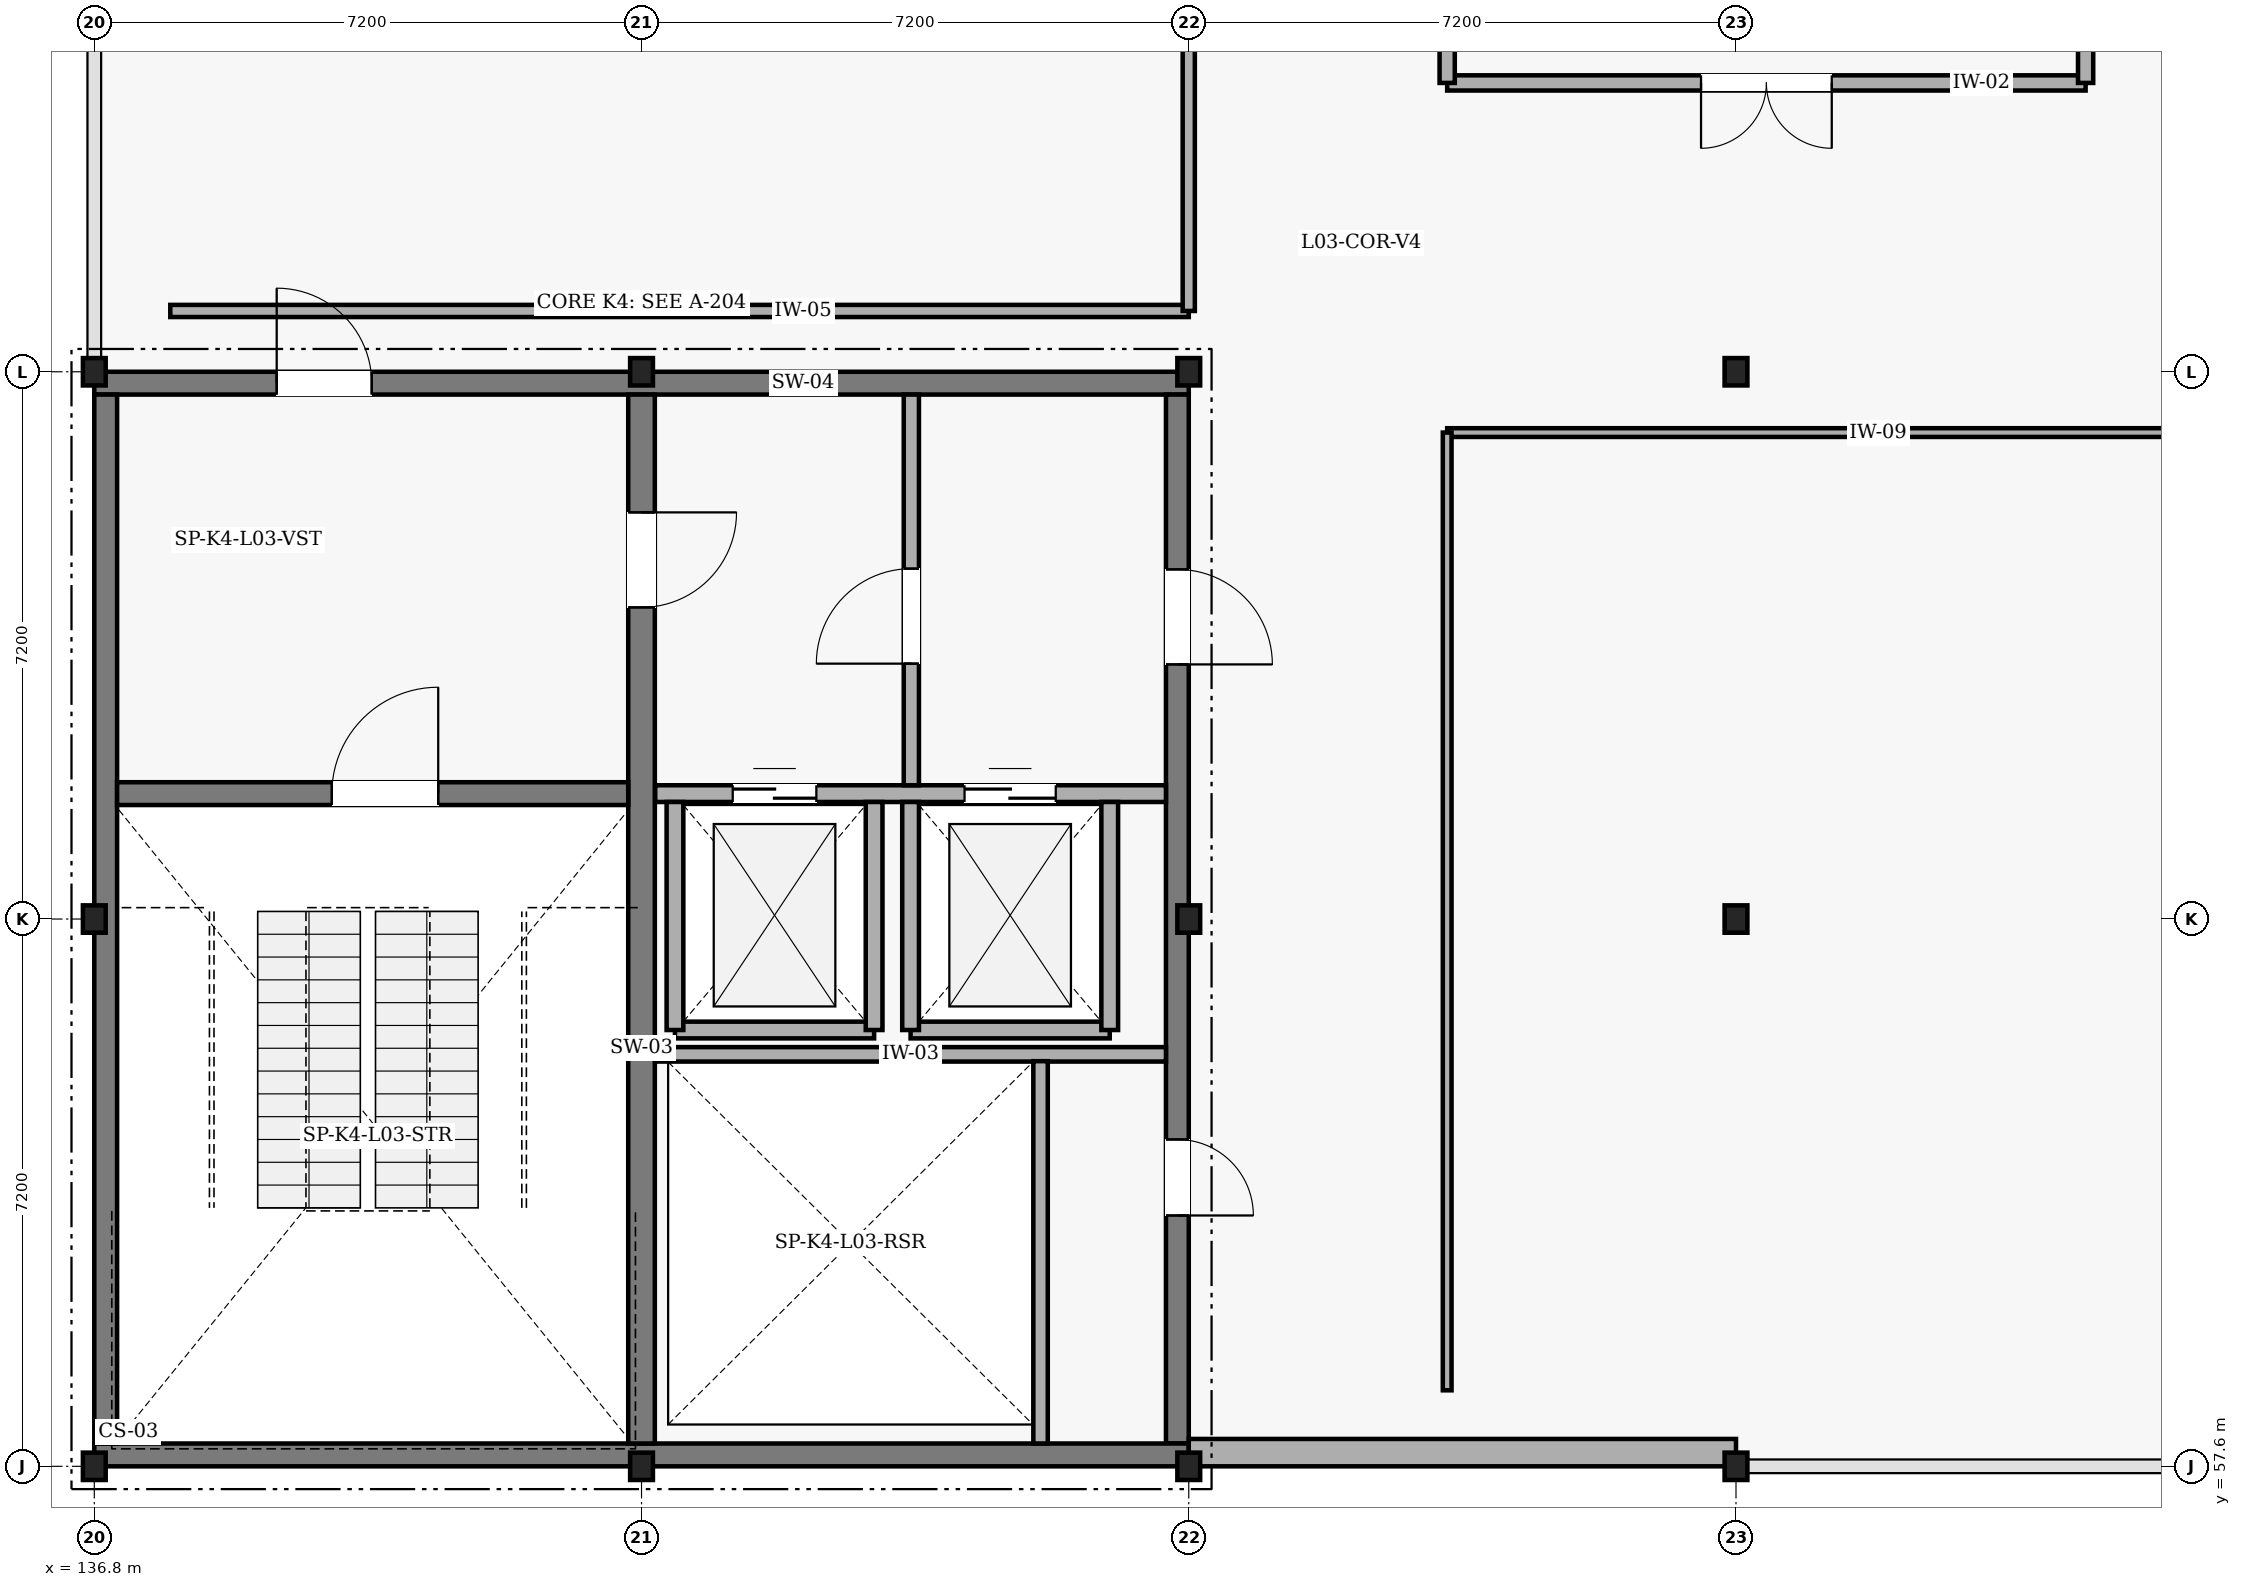
"""IFC4 building model, lengths in metres.
Left out: names, types, materials, properties, quantities, classifications, styles, units other than length and angle.
Written with IfcOpenShell. Run it as: python <this file> out.ifc"""

import sys

from ifc_helpers import new_model, si_unit, direction, frame, frame_2d, origin, origin_2d, place, context, subcontext, project, spatial, rectangle, i_section, extrude, element, fill, save


model = new_model("IFC4")
c1 = context("Model", 3, precision=1e-05, world=origin(), true_north=direction((0.0, 1.0)))
c2 = subcontext(c1, "Body", "Model", "MODEL_VIEW")
j1 = project(units=[si_unit("LENGTHUNIT", "METRE"), si_unit("PLANEANGLEUNIT", "RADIAN")], contexts=[c1])
p1 = place(None, origin())
s1 = spatial("IfcSite", under=j1, at=p1, CompositionType="ELEMENT")
p2 = place(p1, origin())
s2 = spatial("IfcBuilding", under=s1, at=p2, CompositionType="ELEMENT")
p3 = place(p2, frame((0.0, 0.0, 13.8)))
s3 = spatial("IfcBuildingStorey", under=s2, at=p3, CompositionType="ELEMENT", Elevation=13.8)
p4 = place(p3, frame((136.8, 71.85, 0.0), z_axis=(0.0, 0.0, 1.0), x_axis=(1.0, 0.0, 0.0)))
e1 = element("IfcWall", 1, at=p4, inside=s3, PredefinedType="SHEAR", context=c2, shape_type="SweptSolid", body=[
    extrude(rectangle(XDim=14.4, YDim=0.3, at=frame_2d((7.2, 0.0))), origin(), (0.0, 0.0, 1.0), 4.2),
])
p5 = place(p4, frame((2.4, 0.0, 0.0)))
e2 = element("IfcOpeningElement", 2, at=p5, cuts=e1, PredefinedType="OPENING", context=c2, shape_type="SweptSolid", body=[
    extrude(rectangle(XDim=1.25, YDim=2.2, at=frame_2d((0.625, 1.1))), frame((0.0, 0.16, 0.0), z_axis=(0.0, -1.0, 0.0), x_axis=(1.0, 0.0, 0.0)), (0.0, 0.0, 1.0), 0.32),
])
p6 = place(p3, frame((151.05, 71.7, 0.0), z_axis=(0.0, 0.0, 1.0), x_axis=(0.0, -1.0, 0.0)))
e3 = element("IfcWall", 3, at=p6, inside=s3, PredefinedType="SHEAR", context=c2, shape_type="SweptSolid", body=[
    extrude(rectangle(XDim=13.8, YDim=0.3, at=frame_2d((6.9, 0.0))), origin(), (0.0, 0.0, 1.0), 4.2),
])
p7 = place(p6, frame((9.8, 0.0, 0.0)))
e4 = element("IfcOpeningElement", 4, at=p7, cuts=e3, PredefinedType="OPENING", context=c2, shape_type="SweptSolid", body=[
    extrude(rectangle(XDim=1.0, YDim=2.15, at=frame_2d((0.5, 1.075))), frame((0.0, 0.16, 0.0), z_axis=(0.0, -1.0, 0.0), x_axis=(1.0, 0.0, 0.0)), (0.0, 0.0, 1.0), 0.32),
])
p8 = place(p6, frame((2.3, 0.0, 0.0)))
e5 = element("IfcOpeningElement", 5, at=p8, cuts=e3, PredefinedType="OPENING", context=c2, shape_type="SweptSolid", body=[
    extrude(rectangle(XDim=1.25, YDim=2.2, at=frame_2d((0.625, 1.1))), frame((0.0, 0.16, 0.0), z_axis=(0.0, -1.0, 0.0), x_axis=(1.0, 0.0, 0.0)), (0.0, 0.0, 1.0), 0.32),
])
p9 = place(p3, frame((151.2, 57.75, 0.0), z_axis=(0.0, 0.0, 1.0), x_axis=(-1.0, 0.0, 0.0)))
e6 = element("IfcWall", 6, at=p9, inside=s3, PredefinedType="SHEAR", context=c2, shape_type="SweptSolid", body=[
    extrude(rectangle(XDim=14.4, YDim=0.3, at=frame_2d((7.2, 0.0))), origin(), (0.0, 0.0, 1.0), 4.2),
])
p10 = place(p3, frame((136.95, 57.9, 0.0), z_axis=(0.0, 0.0, 1.0), x_axis=(0.0, 1.0, 0.0)))
e7 = element("IfcWall", 7, at=p10, inside=s3, PredefinedType="SHEAR", context=c2, shape_type="SweptSolid", body=[
    extrude(rectangle(XDim=13.8, YDim=0.3, at=frame_2d((6.9, 0.0))), origin(), (0.0, 0.0, 1.0), 4.2),
])
p11 = place(p3, frame((144.0, 71.7, 0.0), z_axis=(0.0, 0.0, 1.0), x_axis=(0.0, -1.0, 0.0)))
e8 = element("IfcWall", 8, at=p11, inside=s3, PredefinedType="SHEAR", context=c2, shape_type="SweptSolid", body=[
    extrude(rectangle(XDim=13.8, YDim=0.35, at=frame_2d((6.9, 0.0))), origin(), (0.0, 0.0, 1.0), 4.2),
])
p12 = place(p11, frame((1.55, 0.0, 0.0)))
e9 = element("IfcOpeningElement", 9, at=p12, cuts=e8, PredefinedType="OPENING", context=c2, shape_type="SweptSolid", body=[
    extrude(rectangle(XDim=1.25, YDim=2.2, at=frame_2d((0.625, 1.1))), frame((0.0, 0.185, 0.0), z_axis=(0.0, -1.0, 0.0), x_axis=(1.0, 0.0, 0.0)), (0.0, 0.0, 1.0), 0.37),
])
p13 = place(p3, frame((137.1, 66.45, 0.0), z_axis=(0.0, 0.0, 1.0), x_axis=(1.0, 0.0, 0.0)))
e10 = element("IfcWall", 10, at=p13, inside=s3, PredefinedType="SHEAR", context=c2, shape_type="SweptSolid", body=[
    extrude(rectangle(XDim=6.725, YDim=0.3, at=frame_2d((3.362, 0.0))), origin(), (0.0, 0.0, 1.0), 4.2),
])
p14 = place(p13, frame((2.825, 0.0, 0.0)))
e11 = element("IfcOpeningElement", 11, at=p14, cuts=e10, PredefinedType="OPENING", context=c2, shape_type="SweptSolid", body=[
    extrude(rectangle(XDim=1.4, YDim=2.2, at=frame_2d((0.7, 1.1))), frame((0.0, 0.16, 0.0), z_axis=(0.0, -1.0, 0.0), x_axis=(1.0, 0.0, 0.0)), (0.0, 0.0, 1.0), 0.32),
])
for number, where, z_axis, x_axis in (
    (12, (136.8, 57.6, 0.0), (0.0, 0.0, 1.0), (1.0, 0.0, 0.0)),
    (13, (136.8, 64.8, 0.0), (0.0, 0.0, 1.0), (1.0, 0.0, 0.0)),
    (14, (136.8, 72.0, 0.0), (0.0, 0.0, 1.0), (1.0, 0.0, 0.0)),
    (15, (144.0, 57.6, 0.0), (0.0, 0.0, 1.0), (1.0, 0.0, 0.0)),
    (16, (144.0, 72.0, 0.0), (0.0, 0.0, 1.0), (1.0, 0.0, 0.0)),
    (17, (151.2, 57.6, 0.0), (0.0, 0.0, 1.0), (1.0, 0.0, 0.0)),
    (18, (151.2, 64.8, 0.0), (0.0, 0.0, 1.0), (1.0, 0.0, 0.0)),
    (19, (151.2, 72.0, 0.0), (0.0, 0.0, 1.0), (1.0, 0.0, 0.0)),
    (20, (158.4, 57.6, 0.0), (0.0, 0.0, 1.0), (1.0, 0.0, 0.0)),
    (21, (158.4, 64.8, 0.0), (0.0, 0.0, 1.0), (1.0, 0.0, 0.0)),
    (22, (158.4, 72.0, 0.0), (0.0, 0.0, 1.0), (1.0, 0.0, 0.0)),
):
    element("IfcColumn", number, at=place(p3, frame(where, z_axis=z_axis, x_axis=x_axis)), inside=s3, PredefinedType="COLUMN", context=c2, shape_type="SweptSolid", body=[
        extrude(i_section(OverallWidth=0.3, OverallDepth=0.36, WebThickness=0.012, FlangeThickness=0.022, FilletRadius=0.027, at=origin_2d()), origin(), (0.0, 0.0, 1.0), 3.92),
    ])
p15 = place(p3, frame((158.4, 57.78, 0.0), z_axis=(0.0, 0.0, 1.0), x_axis=(-1.0, 0.0, 0.0)))
e23 = element("IfcWall", 23, at=p15, inside=s3, PredefinedType="SOLIDWALL", context=c2, shape_type="SweptSolid", body=[
    extrude(rectangle(XDim=7.2, YDim=0.36, at=frame_2d((3.6, 0.0))), origin(), (0.0, 0.0, 1.0), 3.62),
])
p16 = place(p3, frame((144.18, 63.02, 0.0), z_axis=(0.0, 0.0, 1.0), x_axis=(1.0, 0.0, 0.0)))
e24 = element("IfcWall", 24, at=p16, inside=s3, PredefinedType="PARTITIONING", context=c2, shape_type="SweptSolid", body=[
    extrude(rectangle(XDim=6.72, YDim=0.19, at=frame_2d((3.36, 0.0))), origin(), (0.0, 0.0, 1.0), 3.85),
])
p17 = place(p3, frame((149.25, 57.9, 0.0), z_axis=(0.0, 0.0, 1.0), x_axis=(0.0, 1.0, 0.0)))
e25 = element("IfcWall", 25, at=p17, inside=s3, PredefinedType="PARTITIONING", context=c2, shape_type="SweptSolid", body=[
    extrude(rectangle(XDim=5.03, YDim=0.19, at=frame_2d((2.515, 0.0))), origin(), (0.0, 0.0, 1.0), 3.85),
])
p18 = place(p3, frame((144.18, 66.45, 0.0), z_axis=(0.0, 0.0, 1.0), x_axis=(1.0, 0.0, 0.0)))
e26 = element("IfcWall", 26, at=p18, inside=s3, PredefinedType="PARTITIONING", context=c2, shape_type="SweptSolid", body=[
    extrude(rectangle(XDim=6.72, YDim=0.22, at=frame_2d((3.36, 0.0))), origin(), (0.0, 0.0, 1.0), 3.85),
])
p19 = place(p18, frame((1.02, 0.0, 0.0)))
e27 = element("IfcOpeningElement", 27, at=p19, cuts=e26, PredefinedType="OPENING", context=c2, shape_type="SweptSolid", body=[
    extrude(rectangle(XDim=1.1, YDim=2.15, at=frame_2d((0.55, 1.075))), frame((0.0, 0.12, 0.0), z_axis=(0.0, -1.0, 0.0), x_axis=(1.0, 0.0, 0.0)), (0.0, 0.0, 1.0), 0.24),
])
p20 = place(p18, frame((4.07, 0.0, 0.0)))
e28 = element("IfcOpeningElement", 28, at=p20, cuts=e26, PredefinedType="OPENING", context=c2, shape_type="SweptSolid", body=[
    extrude(rectangle(XDim=1.2, YDim=2.15, at=frame_2d((0.6, 1.075))), frame((0.0, 0.12, 0.0), z_axis=(0.0, -1.0, 0.0), x_axis=(1.0, 0.0, 0.0)), (0.0, 0.0, 1.0), 0.24),
])
p21 = place(p3, frame((144.44, 63.34, 0.0), z_axis=(0.0, 0.0, 1.0), x_axis=(1.0, 0.0, 0.0)))
e29 = element("IfcWall", 29, at=p21, inside=s3, PredefinedType="PARTITIONING", context=c2, shape_type="SweptSolid", body=[
    extrude(rectangle(XDim=2.62, YDim=0.22, at=frame_2d((1.31, 0.0))), origin(), (0.0, 0.0, 1.0), 3.85),
])
for number, where, z_axis, x_axis in (
    (30, (144.44, 63.34, 0.0), (0.0, 0.0, 1.0), (0.0, 1.0, 0.0)),
    (31, (147.06, 63.34, 0.0), (0.0, 0.0, 1.0), (0.0, 1.0, 0.0)),
):
    element("IfcWall", number, at=place(p3, frame(where, z_axis=z_axis, x_axis=x_axis)), inside=s3, PredefinedType="PARTITIONING", context=c2, shape_type="SweptSolid", body=[
        extrude(rectangle(XDim=3.0, YDim=0.22, at=frame_2d((1.5, 0.0))), origin(), (0.0, 0.0, 1.0), 3.85),
    ])
p22 = place(p3, frame((147.54, 63.34, 0.0), z_axis=(0.0, 0.0, 1.0), x_axis=(1.0, 0.0, 0.0)))
e32 = element("IfcWall", 32, at=p22, inside=s3, PredefinedType="PARTITIONING", context=c2, shape_type="SweptSolid", body=[
    extrude(rectangle(XDim=2.62, YDim=0.22, at=frame_2d((1.31, 0.0))), origin(), (0.0, 0.0, 1.0), 3.85),
])
for number, where, z_axis, x_axis in (
    (33, (147.54, 63.34, 0.0), (0.0, 0.0, 1.0), (0.0, 1.0, 0.0)),
    (34, (150.16, 63.34, 0.0), (0.0, 0.0, 1.0), (0.0, 1.0, 0.0)),
):
    element("IfcWall", number, at=place(p3, frame(where, z_axis=z_axis, x_axis=x_axis)), inside=s3, PredefinedType="PARTITIONING", context=c2, shape_type="SweptSolid", body=[
        extrude(rectangle(XDim=3.0, YDim=0.22, at=frame_2d((1.5, 0.0))), origin(), (0.0, 0.0, 1.0), 3.85),
    ])
p23 = place(p3, frame((147.55, 66.56, 0.0), z_axis=(0.0, 0.0, 1.0), x_axis=(0.0, 1.0, 0.0)))
e35 = element("IfcWall", 35, at=p23, inside=s3, PredefinedType="PARTITIONING", context=c2, shape_type="SweptSolid", body=[
    extrude(rectangle(XDim=5.14, YDim=0.2, at=frame_2d((2.57, 0.0))), origin(), (0.0, 0.0, 1.0), 3.85),
])
p24 = place(p23, frame((1.6, 0.0, 0.0)))
e36 = element("IfcOpeningElement", 36, at=p24, cuts=e35, PredefinedType="OPENING", context=c2, shape_type="SweptSolid", body=[
    extrude(rectangle(XDim=1.25, YDim=2.2, at=frame_2d((0.625, 1.1))), frame((0.0, 0.11, 0.0), z_axis=(0.0, -1.0, 0.0), x_axis=(1.0, 0.0, 0.0)), (0.0, 0.0, 1.0), 0.22),
])
p25 = place(p3, frame((154.6, 71.2, 0.0), z_axis=(0.0, 0.0, 1.0), x_axis=(1.0, 0.0, 0.0)))
e37 = element("IfcWall", 37, at=p25, inside=s3, PredefinedType="PARTITIONING", context=c2, shape_type="SweptSolid", body=[
    extrude(rectangle(XDim=24.4, YDim=0.115, at=frame_2d((12.2, 0.0))), origin(), (0.0, 0.0, 1.0), 3.52),
])
p26 = place(p25, frame((11.94, 0.0, 0.0)))
e38 = element("IfcOpeningElement", 38, at=p26, cuts=e37, PredefinedType="OPENING", context=c2, shape_type="SweptSolid", body=[
    extrude(rectangle(XDim=1.72, YDim=2.22, at=frame_2d((0.86, 1.11))), frame((0.0, 0.067, 0.0), z_axis=(0.0, -1.0, 0.0), x_axis=(1.0, 0.0, 0.0)), (0.0, 0.0, 1.0), 0.135),
])
p27 = place(p3, frame((154.6, 58.6, 0.0), z_axis=(0.0, 0.0, 1.0), x_axis=(0.0, 1.0, 0.0)))
e39 = element("IfcWall", 39, at=p27, inside=s3, PredefinedType="PARTITIONING", context=c2, shape_type="SweptSolid", body=[
    extrude(rectangle(XDim=12.6, YDim=0.115, at=frame_2d((6.3, 0.0))), origin(), (0.0, 0.0, 1.0), 3.47),
])
p28 = place(p3, frame((151.2, 72.8, 0.0), z_axis=(0.0, 0.0, 1.0), x_axis=(-1.0, 0.0, 0.0)))
e40 = element("IfcWall", 40, at=p28, inside=s3, PredefinedType="PARTITIONING", context=c2, shape_type="SweptSolid", body=[
    extrude(rectangle(XDim=13.4, YDim=0.16, at=frame_2d((6.7, 0.0))), origin(), (0.0, 0.0, 1.0), 3.58),
])
p29 = place(p3, frame((151.2, 85.6, 0.0), z_axis=(0.0, 0.0, 1.0), x_axis=(0.0, -1.0, 0.0)))
e41 = element("IfcWall", 41, at=p29, inside=s3, PredefinedType="PARTITIONING", context=c2, shape_type="SweptSolid", body=[
    extrude(rectangle(XDim=12.8, YDim=0.16, at=frame_2d((6.4, 0.0))), origin(), (0.0, 0.0, 1.0), 3.53),
])
p30 = place(p29, frame((7.34, 0.0, 0.0)))
e42 = element("IfcOpeningElement", 42, at=p30, cuts=e41, PredefinedType="OPENING", context=c2, shape_type="SweptSolid", body=[
    extrude(rectangle(XDim=1.72, YDim=2.22, at=frame_2d((0.86, 1.11))), frame((0.0, 0.09, 0.0), z_axis=(0.0, -1.0, 0.0), x_axis=(1.0, 0.0, 0.0)), (0.0, 0.0, 1.0), 0.18),
])
p31 = place(p3, frame((163.0, 75.8, 0.0), z_axis=(0.0, 0.0, 1.0), x_axis=(-1.0, 0.0, 0.0)))
e43 = element("IfcWall", 43, at=p31, inside=s3, PredefinedType="PARTITIONING", context=c2, shape_type="SweptSolid", body=[
    extrude(rectangle(XDim=8.4, YDim=0.2, at=frame_2d((4.2, 0.0))), origin(), (0.0, 0.0, 1.0), 3.52),
])
p32 = place(p31, frame((3.34, 0.0, 0.0)))
e44 = element("IfcOpeningElement", 44, at=p32, cuts=e43, PredefinedType="OPENING", context=c2, shape_type="SweptSolid", body=[
    extrude(rectangle(XDim=1.72, YDim=2.22, at=frame_2d((0.86, 1.11))), frame((0.0, 0.11, 0.0), z_axis=(0.0, -1.0, 0.0), x_axis=(1.0, 0.0, 0.0)), (0.0, 0.0, 1.0), 0.22),
])
p33 = place(p3, frame((163.0, 85.6, 0.0), z_axis=(0.0, 0.0, 1.0), x_axis=(0.0, -1.0, 0.0)))
e45 = element("IfcWall", 45, at=p33, inside=s3, PredefinedType="PARTITIONING", context=c2, shape_type="SweptSolid", body=[
    extrude(rectangle(XDim=9.8, YDim=0.2, at=frame_2d((4.9, 0.0))), origin(), (0.0, 0.0, 1.0), 3.47),
])
p34 = place(p3, frame((154.6, 75.8, 0.0), z_axis=(0.0, 0.0, 1.0), x_axis=(0.0, 1.0, 0.0)))
e46 = element("IfcWall", 46, at=p34, inside=s3, PredefinedType="PARTITIONING", context=c2, shape_type="SweptSolid", body=[
    extrude(rectangle(XDim=9.8, YDim=0.2, at=frame_2d((4.9, 0.0))), origin(), (0.0, 0.0, 1.0), 3.53),
])
p35 = place(p14, origin())
e47 = element("IfcDoor", 47, at=p35, inside=s3, OperationType="SINGLE_SWING_RIGHT", PredefinedType="DOOR", context=c2, shape_type="SweptSolid", body=[
    extrude(rectangle(XDim=1.4, YDim=2.2, at=frame_2d((0.7, 1.1))), frame((0.0, 0.025, 0.0), z_axis=(0.0, -1.0, 0.0), x_axis=(1.0, 0.0, 0.0)), (0.0, 0.0, 1.0), 0.05),
])
fill(e11, e47)
p36 = place(p12, origin())
e48 = element("IfcDoor", 48, at=p36, inside=s3, OperationType="SINGLE_SWING_LEFT", PredefinedType="DOOR", context=c2, shape_type="SweptSolid", body=[
    extrude(rectangle(XDim=1.25, YDim=2.2, at=frame_2d((0.625, 1.1))), frame((0.0, 0.025, 0.0), z_axis=(0.0, -1.0, 0.0), x_axis=(1.0, 0.0, 0.0)), (0.0, 0.0, 1.0), 0.05),
])
fill(e9, e48)
p37 = place(p7, origin())
e49 = element("IfcDoor", 49, at=p37, inside=s3, OperationType="SINGLE_SWING_RIGHT", PredefinedType="DOOR", context=c2, shape_type="SweptSolid", body=[
    extrude(rectangle(XDim=1.0, YDim=2.15, at=frame_2d((0.5, 1.075))), frame((0.0, 0.025, 0.0), z_axis=(0.0, -1.0, 0.0), x_axis=(1.0, 0.0, 0.0)), (0.0, 0.0, 1.0), 0.05),
])
fill(e4, e49)
p38 = place(p19, origin())
e50 = element("IfcDoor", 50, at=p38, inside=s3, OperationType="DOUBLE_DOOR_SLIDING", PredefinedType="DOOR", context=c2, shape_type="SweptSolid", body=[
    extrude(rectangle(XDim=1.1, YDim=2.15, at=frame_2d((0.55, 1.075))), frame((0.0, 0.025, 0.0), z_axis=(0.0, -1.0, 0.0), x_axis=(1.0, 0.0, 0.0)), (0.0, 0.0, 1.0), 0.05),
])
fill(e27, e50)
p39 = place(p20, origin())
e51 = element("IfcDoor", 51, at=p39, inside=s3, OperationType="DOUBLE_DOOR_SLIDING", PredefinedType="DOOR", context=c2, shape_type="SweptSolid", body=[
    extrude(rectangle(XDim=1.2, YDim=2.15, at=frame_2d((0.6, 1.075))), frame((0.0, 0.025, 0.0), z_axis=(0.0, -1.0, 0.0), x_axis=(1.0, 0.0, 0.0)), (0.0, 0.0, 1.0), 0.05),
])
fill(e28, e51)
p40 = place(p24, origin())
e52 = element("IfcDoor", 52, at=p40, inside=s3, OperationType="SINGLE_SWING_LEFT", PredefinedType="DOOR", context=c2, shape_type="SweptSolid", body=[
    extrude(rectangle(XDim=1.25, YDim=2.2, at=frame_2d((0.625, 1.1))), frame((0.0, 0.025, 0.0), z_axis=(0.0, -1.0, 0.0), x_axis=(1.0, 0.0, 0.0)), (0.0, 0.0, 1.0), 0.05),
])
fill(e36, e52)
p41 = place(p8, origin())
e53 = element("IfcDoor", 53, at=p41, inside=s3, OperationType="SINGLE_SWING_RIGHT", PredefinedType="DOOR", context=c2, shape_type="SweptSolid", body=[
    extrude(rectangle(XDim=1.25, YDim=2.2, at=frame_2d((0.625, 1.1))), frame((0.0, 0.025, 0.0), z_axis=(0.0, -1.0, 0.0), x_axis=(1.0, 0.0, 0.0)), (0.0, 0.0, 1.0), 0.05),
])
fill(e5, e53)
p42 = place(p5, origin())
e54 = element("IfcDoor", 54, at=p42, inside=s3, OperationType="SINGLE_SWING_LEFT", PredefinedType="DOOR", context=c2, shape_type="SweptSolid", body=[
    extrude(rectangle(XDim=1.25, YDim=2.2, at=frame_2d((0.625, 1.1))), frame((0.0, 0.025, 0.0), z_axis=(0.0, -1.0, 0.0), x_axis=(1.0, 0.0, 0.0)), (0.0, 0.0, 1.0), 0.05),
])
fill(e2, e54)
p43 = place(p32, origin())
e55 = element("IfcDoor", 55, at=p43, inside=s3, OperationType="DOUBLE_DOOR_SINGLE_SWING", PredefinedType="DOOR", context=c2, shape_type="SweptSolid", body=[
    extrude(rectangle(XDim=1.72, YDim=2.22, at=frame_2d((0.86, 1.11))), frame((0.0, 0.025, 0.0), z_axis=(0.0, -1.0, 0.0), x_axis=(1.0, 0.0, 0.0)), (0.0, 0.0, 1.0), 0.05),
])
fill(e44, e55)
save(model, sys.argv[1])
